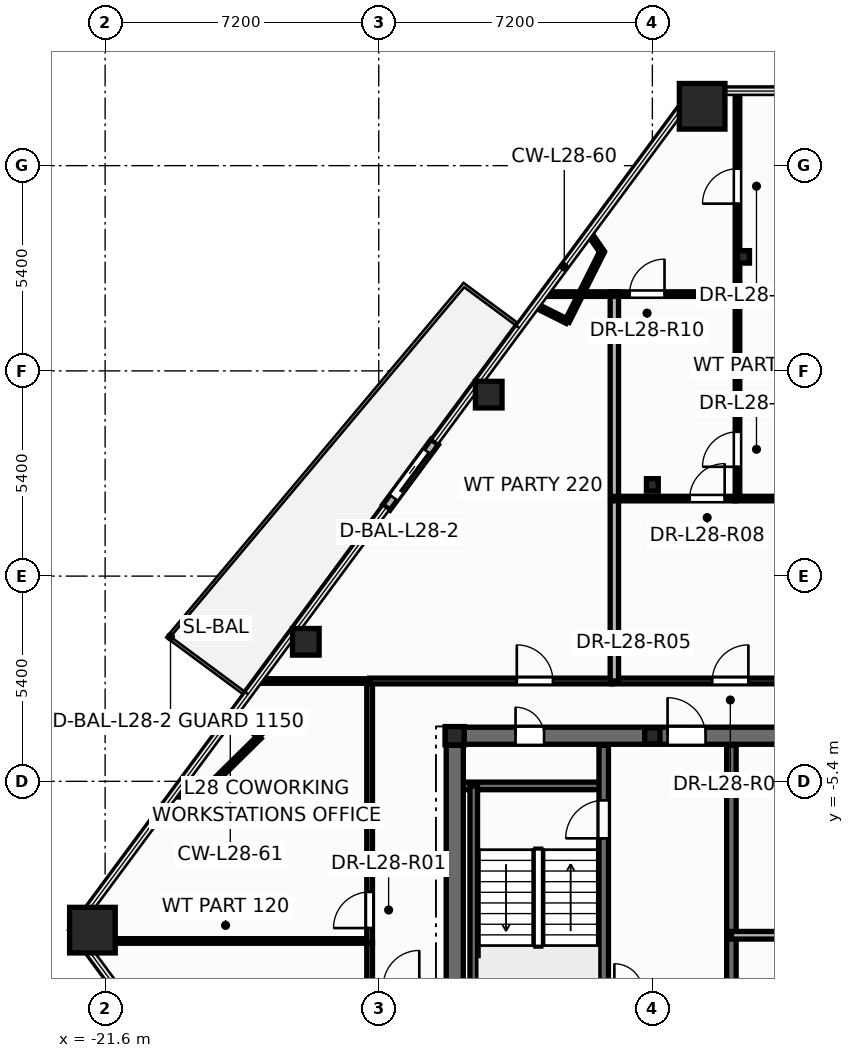
"""IFC4 building model, lengths in metres.
Left out: names, types, materials, properties, quantities, classifications, styles, units other than length and angle.
Written with IfcOpenShell. Run it as: python <this file> out.ifc"""

import sys

from ifc_helpers import new_model, si_unit, direction, frame, frame_2d, origin, origin_2d, place, context, subcontext, project, spatial, rectangle, hollow_rectangle, hollow_circle, i_section, extrude, element, fill, save


model = new_model("IFC4")
c1 = context("Model", 3, precision=1e-05, world=origin(), true_north=direction((0.0, 1.0)))
c2 = subcontext(c1, "Body", "Model", "MODEL_VIEW")
j1 = project(units=[si_unit("LENGTHUNIT", "METRE"), si_unit("PLANEANGLEUNIT", "RADIAN")], contexts=[c1])
p1 = place(None, origin())
s1 = spatial("IfcSite", under=j1, at=p1, CompositionType="ELEMENT")
p2 = place(p1, origin())
s2 = spatial("IfcBuilding", under=s1, at=p2, CompositionType="ELEMENT")
p3 = place(p2, frame((0.0, 0.0, 110.4)))
s3 = spatial("IfcBuildingStorey", under=s2, at=p3, CompositionType="ELEMENT", Elevation=110.4)
for number, where, z_axis, x_axis in (
    (1, (-21.934, -9.316, 0.0), (0.0, 0.0, 1.0), (1.0, 0.0, 0.0)),
    (2, (-5.89, 12.362, 0.0), (0.0, 0.0, 1.0), (1.0, 0.0, 0.0)),
):
    element("IfcColumn", number, at=place(p3, frame(where, z_axis=z_axis, x_axis=x_axis)), inside=s3, PredefinedType="COLUMN", context=c2, shape_type="SweptSolid", body=[
        extrude(hollow_rectangle(XDim=1.2, YDim=1.2, WallThickness=0.055, at=origin_2d()), origin(), (0.0, 0.0, 1.0), 3.6),
    ])
for number, where, z_axis, x_axis in (
    (3, (-11.506, 4.775, 0.0), (0.0, 0.0, 1.0), (1.0, 0.0, 0.0)),
    (4, (-16.319, -1.729, 0.0), (0.0, 0.0, 1.0), (1.0, 0.0, 0.0)),
):
    element("IfcColumn", number, at=place(p3, frame(where, z_axis=z_axis, x_axis=x_axis)), inside=s3, PredefinedType="COLUMN", context=c2, shape_type="SweptSolid", body=[
        extrude(hollow_circle(Radius=0.35, WallThickness=0.03, at=origin_2d()), origin(), (0.0, 0.0, 1.0), 3.6),
    ])
p4 = place(p3, frame((-12.4, -4.2, 0.0), z_axis=(0.0, 0.0, 1.0), x_axis=(1.0, 0.0, 0.0)))
e5 = element("IfcColumn", 5, at=p4, inside=s3, PredefinedType="COLUMN", context=c2, shape_type="SweptSolid", body=[
    extrude(i_section(OverallWidth=0.5, OverallDepth=0.482, WebThickness=0.04, FlangeThickness=0.045, at=origin_2d()), origin(), (0.0, 0.0, 1.0), 3.6),
])
p5 = place(p3, frame((-7.2, -4.2, 0.0), z_axis=(0.0, 0.0, 1.0), x_axis=(1.0, 0.0, 0.0)))
e6 = element("IfcColumn", 6, at=p5, inside=s3, PredefinedType="PILASTER", context=c2, shape_type="SweptSolid", body=[
    extrude(i_section(OverallWidth=0.405, OverallDepth=0.414, WebThickness=0.022, FlangeThickness=0.032, at=origin_2d()), origin(), (0.0, 0.0, 1.0), 3.6),
])
for number, where, z_axis, x_axis in (
    (7, (-7.2, 2.4, 0.0), (0.0, 0.0, 1.0), (1.0, 0.0, 0.0)),
    (8, (-4.8, 8.4, 0.0), (0.0, 0.0, 1.0), (1.0, 0.0, 0.0)),
):
    element("IfcColumn", number, at=place(p3, frame(where, z_axis=z_axis, x_axis=x_axis)), inside=s3, PredefinedType="COLUMN", context=c2, shape_type="SweptSolid", body=[
        extrude(i_section(OverallWidth=0.311, OverallDepth=0.327, WebThickness=0.016, FlangeThickness=0.025, at=origin_2d()), origin(), (0.0, 0.0, 1.0), 3.6),
    ])
p6 = place(p3, frame((-12.926, 3.528, -0.015), z_axis=(0.0, 0.0, 1.0), x_axis=(-0.594840056707, -0.803844081235, 0.0)))
e9 = element("IfcWall", 9, at=p6, inside=s3, PredefinedType="STANDARD", context=c2, shape_type="SweptSolid", body=[
    extrude(rectangle(XDim=2.14, YDim=0.24, at=frame_2d((1.07, 0.0))), origin(), (0.0, 0.0, 1.0), 2.728),
])
p7 = place(p6, frame((0.32, 0.0, 0.015)))
e10 = element("IfcOpeningElement", 10, at=p7, cuts=e9, PredefinedType="OPENING", context=c2, shape_type="SweptSolid", body=[
    extrude(rectangle(XDim=1.506, YDim=2.204, at=frame_2d((0.75, 1.102))), frame((0.0, 0.13, 0.0), z_axis=(0.0, -1.0, 0.0), x_axis=(1.0, 0.0, 0.0)), (0.0, 0.0, 1.0), 0.26),
])
p8 = place(p3, frame((-12.65, -4.2, 0.0), z_axis=(0.0, 0.0, 1.0), x_axis=(1.0, 0.0, 0.0)))
e11 = element("IfcWall", 11, at=p8, inside=s3, PredefinedType="SHEAR", context=c2, shape_type="SweptSolid", body=[
    extrude(rectangle(XDim=25.3, YDim=0.45, at=frame_2d((12.65, 0.0))), origin(), (0.0, 0.0, 1.0), 3.6),
])
p9 = place(p8, frame((1.85, 0.0, 0.0)))
e12 = element("IfcOpeningElement", 12, at=p9, cuts=e11, PredefinedType="OPENING", context=c2, shape_type="SweptSolid", body=[
    extrude(rectangle(XDim=0.756, YDim=2.054, at=frame_2d((0.375, 1.027))), frame((0.0, 0.235, 0.0), z_axis=(0.0, -1.0, 0.0), x_axis=(1.0, 0.0, 0.0)), (0.0, 0.0, 1.0), 0.47),
])
p10 = place(p8, frame((21.85, 0.0, 0.0)))
e13 = element("IfcOpeningElement", 13, at=p10, cuts=e11, PredefinedType="OPENING", context=c2, shape_type="SweptSolid", body=[
    extrude(rectangle(XDim=0.756, YDim=2.054, at=frame_2d((0.375, 1.027))), frame((0.0, 0.235, 0.0), z_axis=(0.0, -1.0, 0.0), x_axis=(1.0, 0.0, 0.0)), (0.0, 0.0, 1.0), 0.47),
])
p11 = place(p8, frame((23.5, 0.0, 0.0)))
e14 = element("IfcOpeningElement", 14, at=p11, cuts=e11, PredefinedType="OPENING", context=c2, shape_type="SweptSolid", body=[
    extrude(rectangle(XDim=0.756, YDim=2.054, at=frame_2d((0.375, 1.027))), frame((0.0, 0.235, 0.0), z_axis=(0.0, -1.0, 0.0), x_axis=(1.0, 0.0, 0.0)), (0.0, 0.0, 1.0), 0.47),
])
p12 = place(p8, frame((5.85, 0.0, 0.0)))
e15 = element("IfcOpeningElement", 15, at=p12, cuts=e11, PredefinedType="OPENING", context=c2, shape_type="SweptSolid", body=[
    extrude(rectangle(XDim=1.006, YDim=2.104, at=frame_2d((0.5, 1.052))), frame((0.0, 0.235, 0.0), z_axis=(0.0, -1.0, 0.0), x_axis=(1.0, 0.0, 0.0)), (0.0, 0.0, 1.0), 0.47),
])
p13 = place(p8, frame((10.35, 0.0, 0.0)))
e16 = element("IfcOpeningElement", 16, at=p13, cuts=e11, PredefinedType="OPENING", context=c2, shape_type="SweptSolid", body=[
    extrude(rectangle(XDim=1.406, YDim=2.154, at=frame_2d((0.7, 1.077))), frame((0.0, 0.235, 0.0), z_axis=(0.0, -1.0, 0.0), x_axis=(1.0, 0.0, 0.0)), (0.0, 0.0, 1.0), 0.47),
])
p14 = place(p8, frame((18.45, 0.0, 0.0)))
e17 = element("IfcOpeningElement", 17, at=p14, cuts=e11, PredefinedType="OPENING", context=c2, shape_type="SweptSolid", body=[
    extrude(rectangle(XDim=1.006, YDim=2.104, at=frame_2d((0.5, 1.052))), frame((0.0, 0.235, 0.0), z_axis=(0.0, -1.0, 0.0), x_axis=(1.0, 0.0, 0.0)), (0.0, 0.0, 1.0), 0.47),
])
p15 = place(p3, frame((-12.35, -5.52, 0.0), z_axis=(0.0, 0.0, 1.0), x_axis=(1.0, 0.0, 0.0)))
e18 = element("IfcWall", 18, at=p15, inside=s3, PredefinedType="SOLIDWALL", context=c2, shape_type="SweptSolid", body=[
    extrude(rectangle(XDim=3.87, YDim=0.2, at=frame_2d((1.935, 0.0))), origin(), (0.0, 0.0, 1.0), 3.6),
])
p16 = place(p3, frame((-11.9, -13.1, 0.0), z_axis=(0.0, 0.0, 1.0), x_axis=(0.0, 1.0, 0.0)))
e19 = element("IfcWall", 19, at=p16, inside=s3, PredefinedType="SOLIDWALL", context=c2, shape_type="SweptSolid", body=[
    extrude(rectangle(XDim=7.58, YDim=0.2, at=frame_2d((3.79, 0.0))), origin(), (0.0, 0.0, 1.0), 3.6),
])
p17 = place(p3, frame((-8.48, -13.85, 0.0), z_axis=(0.0, 0.0, 1.0), x_axis=(0.0, 1.0, 0.0)))
e20 = element("IfcWall", 20, at=p17, inside=s3, PredefinedType="SHEAR", context=c2, shape_type="SweptSolid", body=[
    extrude(rectangle(XDim=9.4, YDim=0.25, at=frame_2d((4.7, 0.0))), origin(), (0.0, 0.0, 1.0), 3.6),
])
p18 = place(p17, frame((6.95, 0.0, 0.0)))
e21 = element("IfcOpeningElement", 21, at=p18, cuts=e20, PredefinedType="OPENING", context=c2, shape_type="SweptSolid", body=[
    extrude(rectangle(XDim=1.006, YDim=2.104, at=frame_2d((0.5, 1.052))), frame((0.0, 0.135, 0.0), z_axis=(0.0, -1.0, 0.0), x_axis=(1.0, 0.0, 0.0)), (0.0, 0.0, 1.0), 0.27),
])
p19 = place(p3, frame((-5.12, -13.85, 0.0), z_axis=(0.0, 0.0, 1.0), x_axis=(0.0, 1.0, 0.0)))
e22 = element("IfcWall", 22, at=p19, inside=s3, PredefinedType="SHEAR", context=c2, shape_type="SweptSolid", body=[
    extrude(rectangle(XDim=9.4, YDim=0.25, at=frame_2d((4.7, 0.0))), origin(), (0.0, 0.0, 1.0), 3.6),
])
p20 = place(p3, frame((-12.4, -13.85, 0.0), z_axis=(0.0, 0.0, 1.0), x_axis=(0.0, 1.0, 0.0)))
e23 = element("IfcWall", 23, at=p20, inside=s3, PredefinedType="SHEAR", context=c2, shape_type="SweptSolid", body=[
    extrude(rectangle(XDim=9.4, YDim=0.45, at=frame_2d((4.7, 0.0))), origin(), (0.0, 0.0, 1.0), 3.6),
])
p21 = place(p3, frame((-5.12, -9.45, 0.0), z_axis=(0.0, 0.0, 1.0), x_axis=(1.0, 0.0, 0.0)))
e24 = element("IfcWall", 24, at=p21, inside=s3, PredefinedType="SOLIDWALL", context=c2, shape_type="SweptSolid", body=[
    extrude(rectangle(XDim=2.24, YDim=0.2, at=frame_2d((1.12, 0.0))), origin(), (0.0, 0.0, 1.0), 3.35),
])
p22 = place(p3, frame((-8.26, -2.76, 0.0), z_axis=(0.0, 0.0, 1.0), x_axis=(1.0, 0.0, 0.0)))
e25 = element("IfcWall", 25, at=p22, inside=s3, PredefinedType="PARTITIONING", context=c2, shape_type="SweptSolid", body=[
    extrude(rectangle(XDim=8.9, YDim=0.15, at=frame_2d((4.45, 0.0))), origin(), (0.0, 0.0, 1.0), 2.325),
])
p23 = place(p22, frame((2.637, 0.0, 0.0)))
e26 = element("IfcOpeningElement", 26, at=p23, cuts=e25, PredefinedType="OPENING", context=c2, shape_type="SweptSolid", body=[
    extrude(rectangle(XDim=0.956, YDim=2.104, at=frame_2d((0.475, 1.052))), frame((0.0, 0.085, 0.0), z_axis=(0.0, -1.0, 0.0), x_axis=(1.0, 0.0, 0.0)), (0.0, 0.0, 1.0), 0.17),
])
p24 = place(p3, frame((-22.221, -9.6, 0.0), z_axis=(0.0, 0.0, 1.0), x_axis=(1.0, 0.0, 0.0)))
e27 = element("IfcWall", 27, at=p24, inside=s3, PredefinedType="PARTITIONING", context=c2, shape_type="SweptSolid", body=[
    extrude(rectangle(XDim=7.582, YDim=0.12, at=frame_2d((3.791, 0.0))), origin(), (0.0, 0.0, 1.0), 2.713),
])
p25 = place(p3, frame((-14.64, -9.66, 0.0), z_axis=(0.0, 0.0, 1.0), x_axis=(0.0, 1.0, 0.0)))
e28 = element("IfcWall", 28, at=p25, inside=s3, PredefinedType="PARTITIONING", context=c2, shape_type="SweptSolid", body=[
    extrude(rectangle(XDim=6.9, YDim=0.15, at=frame_2d((3.45, 0.0))), origin(), (0.0, 0.0, 1.0), 2.325),
])
p26 = place(p25, frame((0.399, 0.0, 0.0)))
e29 = element("IfcOpeningElement", 29, at=p26, cuts=e28, PredefinedType="OPENING", context=c2, shape_type="SweptSolid", body=[
    extrude(rectangle(XDim=0.956, YDim=2.104, at=frame_2d((0.475, 1.052))), frame((0.0, 0.085, 0.0), z_axis=(0.0, -1.0, 0.0), x_axis=(1.0, 0.0, 0.0)), (0.0, 0.0, 1.0), 0.17),
])
p27 = place(p3, frame((-14.64, -2.76, 0.0), z_axis=(0.0, 0.0, 1.0), x_axis=(1.0, 0.0, 0.0)))
e30 = element("IfcWall", 30, at=p27, inside=s3, PredefinedType="PARTITIONING", context=c2, shape_type="SweptSolid", body=[
    extrude(rectangle(XDim=6.378, YDim=0.15, at=frame_2d((3.189, 0.0))), origin(), (0.0, 0.0, 1.0), 3.35),
])
p28 = place(p27, frame((3.873, 0.0, 0.0)))
e31 = element("IfcOpeningElement", 31, at=p28, cuts=e30, PredefinedType="OPENING", context=c2, shape_type="SweptSolid", body=[
    extrude(rectangle(XDim=0.956, YDim=2.104, at=frame_2d((0.475, 1.052))), frame((0.0, 0.085, 0.0), z_axis=(0.0, -1.0, 0.0), x_axis=(1.0, 0.0, 0.0)), (0.0, 0.0, 1.0), 0.17),
])
p29 = place(p3, frame((-8.2, -2.76, 0.0), z_axis=(0.0, 0.0, 1.0), x_axis=(0.0, 1.0, 0.0)))
e32 = element("IfcWall", 32, at=p29, inside=s3, PredefinedType="PARTITIONING", context=c2, shape_type="SweptSolid", body=[
    extrude(rectangle(XDim=10.24, YDim=0.22, at=frame_2d((5.12, 0.0))), origin(), (0.0, 0.0, 1.0), 2.325),
])
p30 = place(p3, frame((-4.96, 2.04, 0.0), z_axis=(0.0, 0.0, 1.0), x_axis=(0.0, 1.0, 0.0)))
e33 = element("IfcWall", 33, at=p30, inside=s3, PredefinedType="PARTITIONING", context=c2, shape_type="SweptSolid", body=[
    extrude(rectangle(XDim=5.38, YDim=0.12, at=frame_2d((2.69, 0.0))), origin(), (0.0, 0.0, 1.0), 2.325),
])
p31 = place(p30, frame((0.837, 0.0, 0.0)))
e34 = element("IfcOpeningElement", 34, at=p31, cuts=e33, PredefinedType="OPENING", context=c2, shape_type="SweptSolid", body=[
    extrude(rectangle(XDim=0.926, YDim=2.104, at=frame_2d((0.46, 1.052))), frame((0.0, 0.07, 0.0), z_axis=(0.0, -1.0, 0.0), x_axis=(1.0, 0.0, 0.0)), (0.0, 0.0, 1.0), 0.14),
])
p32 = place(p3, frame((-4.96, 7.42, 0.0), z_axis=(0.0, 0.0, 1.0), x_axis=(0.0, 1.0, 0.0)))
e35 = element("IfcWall", 35, at=p32, inside=s3, PredefinedType="PARTITIONING", context=c2, shape_type="SweptSolid", body=[
    extrude(rectangle(XDim=5.342, YDim=0.12, at=frame_2d((2.671, 0.0))), origin(), (0.0, 0.0, 1.0), 2.325),
])
p33 = place(p32, frame((2.38, 0.0, 0.0)))
e36 = element("IfcOpeningElement", 36, at=p33, cuts=e35, PredefinedType="OPENING", context=c2, shape_type="SweptSolid", body=[
    extrude(rectangle(XDim=0.926, YDim=2.104, at=frame_2d((0.46, 1.052))), frame((0.0, 0.07, 0.0), z_axis=(0.0, -1.0, 0.0), x_axis=(1.0, 0.0, 0.0)), (0.0, 0.0, 1.0), 0.14),
])
p34 = place(p3, frame((-10.045, 7.42, 0.0), z_axis=(0.0, 0.0, 1.0), x_axis=(1.0, 0.0, 0.0)))
e37 = element("IfcWall", 37, at=p34, inside=s3, PredefinedType="PARTITIONING", context=c2, shape_type="SweptSolid", body=[
    extrude(rectangle(XDim=5.085, YDim=0.12, at=frame_2d((2.543, 0.0))), origin(), (0.0, 0.0, 1.0), 2.325),
])
p35 = place(p34, frame((2.246, 0.0, 0.0)))
e38 = element("IfcOpeningElement", 38, at=p35, cuts=e37, PredefinedType="OPENING", context=c2, shape_type="SweptSolid", body=[
    extrude(rectangle(XDim=0.926, YDim=2.104, at=frame_2d((0.46, 1.052))), frame((0.0, 0.07, 0.0), z_axis=(0.0, -1.0, 0.0), x_axis=(1.0, 0.0, 0.0)), (0.0, 0.0, 1.0), 0.14),
])
p36 = place(p3, frame((-5.02, 2.04, 0.0), z_axis=(0.0, 0.0, 1.0), x_axis=(1.0, 0.0, 0.0)))
e39 = element("IfcWall", 39, at=p36, inside=s3, PredefinedType="PARTITIONING", context=c2, shape_type="SweptSolid", body=[
    extrude(rectangle(XDim=3.94, YDim=0.12, at=frame_2d((1.97, 0.0))), origin(), (0.0, 0.0, 1.0), 2.919),
])
p37 = place(p3, frame((-4.96, 7.42, 0.0), z_axis=(0.0, 0.0, 1.0), x_axis=(1.0, 0.0, 0.0)))
e40 = element("IfcWall", 40, at=p37, inside=s3, PredefinedType="PARTITIONING", context=c2, shape_type="SweptSolid", body=[
    extrude(rectangle(XDim=3.82, YDim=0.12, at=frame_2d((1.91, 0.0))), origin(), (0.0, 0.0, 1.0), 2.325),
])
p38 = place(p3, frame((-8.2, 2.04, 0.0), z_axis=(0.0, 0.0, 1.0), x_axis=(1.0, 0.0, 0.0)))
e41 = element("IfcWall", 41, at=p38, inside=s3, PredefinedType="PARTITIONING", context=c2, shape_type="SweptSolid", body=[
    extrude(rectangle(XDim=3.178, YDim=0.12, at=frame_2d((1.589, 0.0))), origin(), (0.0, 0.0, 1.0), 2.325),
])
p39 = place(p38, frame((1.983, 0.0, 0.0)))
e42 = element("IfcOpeningElement", 42, at=p39, cuts=e41, PredefinedType="OPENING", context=c2, shape_type="SweptSolid", body=[
    extrude(rectangle(XDim=0.926, YDim=2.104, at=frame_2d((0.46, 1.052))), frame((0.0, 0.07, 0.0), z_axis=(0.0, -1.0, 0.0), x_axis=(1.0, 0.0, 0.0)), (0.0, 0.0, 1.0), 0.14),
])
p40 = place(p3, frame((-17.58, -2.76, 0.0), z_axis=(0.0, 0.0, 1.0), x_axis=(1.0, 0.0, 0.0)))
e43 = element("IfcWall", 43, at=p40, inside=s3, PredefinedType="PARTITIONING", context=c2, shape_type="SweptSolid", body=[
    extrude(rectangle(XDim=2.94, YDim=0.12, at=frame_2d((1.47, 0.0))), origin(), (0.0, 0.0, 1.0), 2.713),
])
p41 = place(p3, frame((-17.538, -4.229, 0.0), z_axis=(0.0, 0.0, 1.0), x_axis=(-0.711889877925, -0.702291108949, 0.0)))
e44 = element("IfcWall", 44, at=p41, inside=s3, PredefinedType="PARTITIONING", context=c2, shape_type="SweptSolid", body=[
    extrude(rectangle(XDim=2.162, YDim=0.12, at=frame_2d((1.081, 0.0))), origin(), (0.0, 0.0, 1.0), 3.35),
])
p42 = place(p3, frame((-8.523, 8.533, 0.0), z_axis=(0.0, 0.0, 1.0), x_axis=(-0.44873934971, -0.893662685817, 0.0)))
e45 = element("IfcWall", 45, at=p42, inside=s3, PredefinedType="PARTITIONING", context=c2, shape_type="SweptSolid", body=[
    extrude(rectangle(XDim=2.047, YDim=0.12, at=frame_2d((1.024, 0.0))), origin(), (0.0, 0.0, 1.0), 3.35),
])
p43 = place(p3, frame((-14.64, -10.8, 0.0), z_axis=(0.0, 0.0, 1.0), x_axis=(0.0, 1.0, 0.0)))
e46 = element("IfcWall", 46, at=p43, inside=s3, PredefinedType="PARTITIONING", context=c2, shape_type="SweptSolid", body=[
    extrude(rectangle(XDim=1.138, YDim=0.15, at=frame_2d((0.569, 0.0))), origin(), (0.0, 0.0, 1.0), 3.35),
])
p44 = place(p3, frame((-9.442, 6.704, 0.0), z_axis=(0.0, 0.0, 1.0), x_axis=(-0.893678540504, 0.448707773771, 0.0)))
e47 = element("IfcWall", 47, at=p44, inside=s3, PredefinedType="PARTITIONING", context=c2, shape_type="SweptSolid", body=[
    extrude(rectangle(XDim=0.915, YDim=0.12, at=frame_2d((0.457, 0.0))), origin(), (0.0, 0.0, 1.0), 2.713),
])
p45 = place(p3, frame((-18.176, -3.582, 0.0), z_axis=(0.0, 0.0, 1.0), x_axis=(0.702387049148, -0.711795218577, 0.0)))
e48 = element("IfcWall", 48, at=p45, inside=s3, PredefinedType="PARTITIONING", context=c2, shape_type="SweptSolid", body=[
    extrude(rectangle(XDim=0.908, YDim=0.12, at=frame_2d((0.454, 0.0))), origin(), (0.0, 0.0, 1.0), 2.713),
])
p46 = place(p3, frame((-19.077, -5.747, 0.0), z_axis=(0.0, 0.0, 1.0), x_axis=(-0.999965519438, -0.008304211926, 0.0)))
e49 = element("IfcWall", 49, at=p46, inside=s3, PredefinedType="PARTITIONING", context=c2, shape_type="SweptSolid", body=[
    extrude(rectangle(XDim=0.706, YDim=0.12, at=frame_2d((0.353, 0.0))), origin(), (0.0, 0.0, 1.0), 2.713),
])
p47 = place(p3, frame((-8.855, 9.012, 0.0), z_axis=(0.0, 0.0, 1.0), x_axis=(0.569035523294, -0.822312941179, 0.0)))
e50 = element("IfcWall", 50, at=p47, inside=s3, PredefinedType="PARTITIONING", context=c2, shape_type="SweptSolid", body=[
    extrude(rectangle(XDim=0.582, YDim=0.12, at=frame_2d((0.291, 0.0))), origin(), (0.0, 0.0, 1.0), 2.713),
])
p48 = place(p7, origin())
e51 = element("IfcDoor", 51, at=p48, inside=s3, OperationType="SLIDING_TO_RIGHT", PredefinedType="DOOR", context=c2, shape_type="SweptSolid", body=[
    extrude(rectangle(XDim=1.5, YDim=2.2, at=frame_2d((0.75, 1.1))), frame((0.0, 0.025, 0.0), z_axis=(0.0, -1.0, 0.0), x_axis=(1.0, 0.0, 0.0)), (0.0, 0.0, 1.0), 0.05),
])
fill(e10, e51)
p49 = place(p18, origin())
e52 = element("IfcDoor", 52, at=p49, inside=s3, OperationType="SINGLE_SWING_LEFT", PredefinedType="DOOR", context=c2, shape_type="SweptSolid", body=[
    extrude(rectangle(XDim=1.0, YDim=2.1, at=frame_2d((0.5, 1.05))), frame((0.0, 0.025, 0.0), z_axis=(0.0, -1.0, 0.0), x_axis=(1.0, 0.0, 0.0)), (0.0, 0.0, 1.0), 0.05),
])
fill(e21, e52)
p50 = place(p9, origin())
e53 = element("IfcDoor", 53, at=p50, inside=s3, OperationType="SINGLE_SWING_LEFT", PredefinedType="DOOR", context=c2, shape_type="SweptSolid", body=[
    extrude(rectangle(XDim=0.75, YDim=2.05, at=frame_2d((0.375, 1.025))), frame((0.0, 0.025, 0.0), z_axis=(0.0, -1.0, 0.0), x_axis=(1.0, 0.0, 0.0)), (0.0, 0.0, 1.0), 0.05),
])
fill(e12, e53)
p51 = place(p12, origin())
e54 = element("IfcDoor", 54, at=p51, inside=s3, OperationType="SINGLE_SWING_LEFT", PredefinedType="DOOR", context=c2, shape_type="SweptSolid", body=[
    extrude(rectangle(XDim=1.0, YDim=2.1, at=frame_2d((0.5, 1.05))), frame((0.0, 0.025, 0.0), z_axis=(0.0, -1.0, 0.0), x_axis=(1.0, 0.0, 0.0)), (0.0, 0.0, 1.0), 0.05),
])
fill(e15, e54)
p52 = place(p26, origin())
e55 = element("IfcDoor", 55, at=p52, inside=s3, OperationType="SINGLE_SWING_LEFT", PredefinedType="DOOR", context=c2, shape_type="SweptSolid", body=[
    extrude(rectangle(XDim=0.95, YDim=2.1, at=frame_2d((0.475, 1.05))), frame((0.0, 0.025, 0.0), z_axis=(0.0, -1.0, 0.0), x_axis=(1.0, 0.0, 0.0)), (0.0, 0.0, 1.0), 0.05),
])
fill(e29, e55)
p53 = place(p28, origin())
e56 = element("IfcDoor", 56, at=p53, inside=s3, OperationType="SINGLE_SWING_LEFT", PredefinedType="DOOR", context=c2, shape_type="SweptSolid", body=[
    extrude(rectangle(XDim=0.95, YDim=2.1, at=frame_2d((0.475, 1.05))), frame((0.0, 0.025, 0.0), z_axis=(0.0, -1.0, 0.0), x_axis=(1.0, 0.0, 0.0)), (0.0, 0.0, 1.0), 0.05),
])
fill(e31, e56)
p54 = place(p23, origin())
e57 = element("IfcDoor", 57, at=p54, inside=s3, OperationType="SINGLE_SWING_RIGHT", PredefinedType="DOOR", context=c2, shape_type="SweptSolid", body=[
    extrude(rectangle(XDim=0.95, YDim=2.1, at=frame_2d((0.475, 1.05))), frame((0.0, 0.025, 0.0), z_axis=(0.0, -1.0, 0.0), x_axis=(1.0, 0.0, 0.0)), (0.0, 0.0, 1.0), 0.05),
])
fill(e26, e57)
p55 = place(p39, origin())
e58 = element("IfcDoor", 58, at=p55, inside=s3, OperationType="SINGLE_SWING_RIGHT", PredefinedType="DOOR", context=c2, shape_type="SweptSolid", body=[
    extrude(rectangle(XDim=0.92, YDim=2.1, at=frame_2d((0.46, 1.05))), frame((0.0, 0.025, 0.0), z_axis=(0.0, -1.0, 0.0), x_axis=(1.0, 0.0, 0.0)), (0.0, 0.0, 1.0), 0.05),
])
fill(e42, e58)
p56 = place(p31, origin())
e59 = element("IfcDoor", 59, at=p56, inside=s3, OperationType="SINGLE_SWING_LEFT", PredefinedType="DOOR", context=c2, shape_type="SweptSolid", body=[
    extrude(rectangle(XDim=0.92, YDim=2.1, at=frame_2d((0.46, 1.05))), frame((0.0, 0.025, 0.0), z_axis=(0.0, -1.0, 0.0), x_axis=(1.0, 0.0, 0.0)), (0.0, 0.0, 1.0), 0.05),
])
fill(e34, e59)
p57 = place(p35, origin())
e60 = element("IfcDoor", 60, at=p57, inside=s3, OperationType="SINGLE_SWING_RIGHT", PredefinedType="DOOR", context=c2, shape_type="SweptSolid", body=[
    extrude(rectangle(XDim=0.92, YDim=2.1, at=frame_2d((0.46, 1.05))), frame((0.0, 0.025, 0.0), z_axis=(0.0, -1.0, 0.0), x_axis=(1.0, 0.0, 0.0)), (0.0, 0.0, 1.0), 0.05),
])
fill(e38, e60)
p58 = place(p33, origin())
e61 = element("IfcDoor", 61, at=p58, inside=s3, OperationType="SINGLE_SWING_LEFT", PredefinedType="DOOR", context=c2, shape_type="SweptSolid", body=[
    extrude(rectangle(XDim=0.92, YDim=2.1, at=frame_2d((0.46, 1.05))), frame((0.0, 0.025, 0.0), z_axis=(0.0, -1.0, 0.0), x_axis=(1.0, 0.0, 0.0)), (0.0, 0.0, 1.0), 0.05),
])
fill(e36, e61)
save(model, sys.argv[1])
